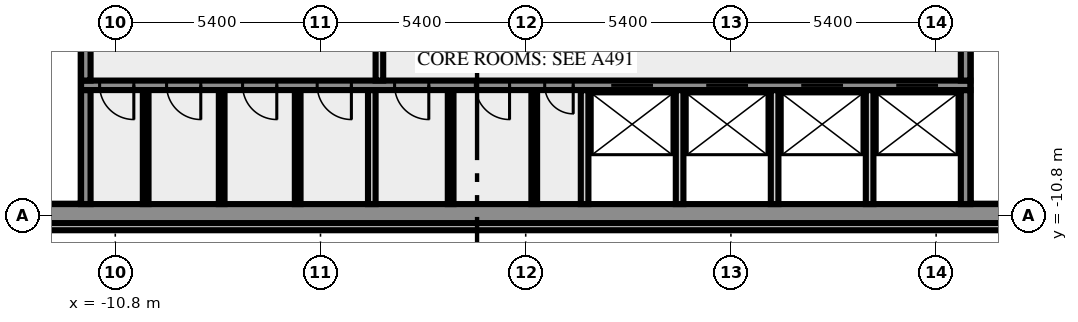
"""IFC4 building model, lengths in metres.
Left out: names, types, materials, properties, quantities, classifications, styles, units other than length and angle.
Written with IfcOpenShell. Run it as: python <this file> out.ifc"""

import sys

from ifc_helpers import new_model, si_unit, direction, frame, frame_2d, origin, place, context, subcontext, project, spatial, rectangle, extrude, element, fill, save


model = new_model("IFC4")
c1 = context("Model", 3, precision=1e-05, world=origin(), true_north=direction((0.0, 1.0)))
c2 = subcontext(c1, "Body", "Model", "MODEL_VIEW")
j1 = project(units=[si_unit("LENGTHUNIT", "METRE"), si_unit("PLANEANGLEUNIT", "RADIAN")], contexts=[c1])
p1 = place(None, origin())
s1 = spatial("IfcSite", under=j1, at=p1, CompositionType="ELEMENT")
p2 = place(p1, origin())
s2 = spatial("IfcBuilding", under=s1, at=p2, CompositionType="ELEMENT")
p3 = place(p2, frame((0.0, 0.0, 198.0)))
s3 = spatial("IfcBuildingStorey", under=s2, at=p3, CompositionType="ELEMENT", Elevation=198.0)
p4 = place(p3, frame((-17.444, -11.088, 0.0), z_axis=(0.0, 0.0, 1.0), x_axis=(1.0, 0.0, 0.0)))
e1 = element("IfcWall", 1, at=p4, inside=s3, PredefinedType="SOLIDWALL", context=c2, shape_type="SweptSolid", body=[
    extrude(rectangle(XDim=34.888, YDim=0.2, at=frame_2d((17.444, 0.0))), origin(), (0.0, 0.0, 1.0), 3.65),
])
p5 = place(p3, frame((-20.0, -10.75, 0.0), z_axis=(0.0, 0.0, 1.0), x_axis=(1.0, 0.0, 0.0)))
e2 = element("IfcWall", 2, at=p5, inside=s3, PredefinedType="SHEAR", context=c2, shape_type="SweptSolid", body=[
    extrude(rectangle(XDim=40.0, YDim=0.5, at=frame_2d((20.0, 0.0))), origin(), (0.0, 0.0, 1.0), 3.65),
])
p6 = place(p5, frame((0.8, 0.0, 1.0)))
e3 = element("IfcOpeningElement", 3, at=p6, cuts=e2, PredefinedType="OPENING", context=c2, shape_type="SweptSolid", body=[
    extrude(rectangle(XDim=1.2, YDim=1.2, at=frame_2d((0.6, 0.6))), frame((0.0, 0.26, 0.0), z_axis=(0.0, -1.0, 0.0), x_axis=(1.0, 0.0, 0.0)), (0.0, 0.0, 1.0), 0.52),
])
p7 = place(p5, frame((38.0, 0.0, 1.0)))
e4 = element("IfcOpeningElement", 4, at=p7, cuts=e2, PredefinedType="OPENING", context=c2, shape_type="SweptSolid", body=[
    extrude(rectangle(XDim=1.2, YDim=1.2, at=frame_2d((0.6, 0.6))), frame((0.0, 0.26, 0.0), z_axis=(0.0, -1.0, 0.0), x_axis=(1.0, 0.0, 0.0)), (0.0, 0.0, 1.0), 0.52),
])
p8 = place(p3, frame((-11.575, -10.5, 0.0), z_axis=(0.0, 0.0, 1.0), x_axis=(0.0, 1.0, 0.0)))
e5 = element("IfcWall", 5, at=p8, inside=s3, PredefinedType="SHEAR", context=c2, shape_type="SweptSolid", body=[
    extrude(rectangle(XDim=3.0, YDim=0.25, at=frame_2d((1.5, 0.0))), origin(), (0.0, 0.0, 1.0), 3.65),
])
for number, where, z_axis, x_axis in (
    (6, (-10.0, -10.5, 0.0), (0.0, 0.0, 1.0), (0.0, 1.0, 0.0)),
    (7, (-8.0, -10.5, 0.0), (0.0, 0.0, 1.0), (0.0, 1.0, 0.0)),
    (8, (-6.0, -10.5, 0.0), (0.0, 0.0, 1.0), (0.0, 1.0, 0.0)),
):
    element("IfcWall", number, at=place(p3, frame(where, z_axis=z_axis, x_axis=x_axis)), inside=s3, PredefinedType="PARTITIONING", context=c2, shape_type="SweptSolid", body=[
        extrude(rectangle(XDim=3.0, YDim=0.15, at=frame_2d((1.5, 0.0))), origin(), (0.0, 0.0, 1.0), 3.65),
    ])
p9 = place(p3, frame((-4.05, -10.5, 0.0), z_axis=(0.0, 0.0, 1.0), x_axis=(0.0, 1.0, 0.0)))
e9 = element("IfcWall", 9, at=p9, inside=s3, PredefinedType="SOLIDWALL", context=c2, shape_type="SweptSolid", body=[
    extrude(rectangle(XDim=3.0, YDim=0.2, at=frame_2d((1.5, 0.0))), origin(), (0.0, 0.0, 1.0), 3.65),
])
for number, where, z_axis, x_axis in (
    (10, (-1.975, -10.5, 0.0), (0.0, 0.0, 1.0), (0.0, 1.0, 0.0)),
    (11, (0.225, -10.5, 0.0), (0.0, 0.0, 1.0), (0.0, 1.0, 0.0)),
):
    element("IfcWall", number, at=place(p3, frame(where, z_axis=z_axis, x_axis=x_axis)), inside=s3, PredefinedType="PARTITIONING", context=c2, shape_type="SweptSolid", body=[
        extrude(rectangle(XDim=3.0, YDim=0.15, at=frame_2d((1.5, 0.0))), origin(), (0.0, 0.0, 1.0), 3.65),
    ])
for number, where, z_axis, x_axis in (
    (12, (1.55, -10.5, 0.0), (0.0, 0.0, 1.0), (0.0, 1.0, 0.0)),
    (13, (4.05, -10.5, 0.0), (0.0, 0.0, 1.0), (0.0, 1.0, 0.0)),
    (14, (6.55, -10.5, 0.0), (0.0, 0.0, 1.0), (0.0, 1.0, 0.0)),
    (15, (9.05, -10.5, 0.0), (0.0, 0.0, 1.0), (0.0, 1.0, 0.0)),
):
    element("IfcWall", number, at=place(p3, frame(where, z_axis=z_axis, x_axis=x_axis)), inside=s3, PredefinedType="SOLIDWALL", context=c2, shape_type="SweptSolid", body=[
        extrude(rectangle(XDim=3.0, YDim=0.2, at=frame_2d((1.5, 0.0))), origin(), (0.0, 0.0, 1.0), 3.65),
    ])
p10 = place(p3, frame((11.575, -10.5, 0.0), z_axis=(0.0, 0.0, 1.0), x_axis=(0.0, 1.0, 0.0)))
e16 = element("IfcWall", 16, at=p10, inside=s3, PredefinedType="SHEAR", context=c2, shape_type="SweptSolid", body=[
    extrude(rectangle(XDim=3.0, YDim=0.25, at=frame_2d((1.5, 0.0))), origin(), (0.0, 0.0, 1.0), 3.65),
])
p11 = place(p3, frame((11.7, -7.375, 0.0), z_axis=(0.0, 0.0, 1.0), x_axis=(-1.0, 0.0, 0.0)))
e17 = element("IfcWall", 17, at=p11, inside=s3, PredefinedType="SHEAR", context=c2, shape_type="SweptSolid", body=[
    extrude(rectangle(XDim=23.4, YDim=0.25, at=frame_2d((11.7, 0.0))), origin(), (0.0, 0.0, 1.0), 3.65),
])
p12 = place(p11, frame((22.012, 0.0, 0.0)))
e18 = element("IfcOpeningElement", 18, at=p12, cuts=e17, PredefinedType="OPENING", context=c2, shape_type="SweptSolid", body=[
    extrude(rectangle(XDim=0.9, YDim=2.1, at=frame_2d((0.45, 1.05))), frame((0.0, 0.135, 0.0), z_axis=(0.0, -1.0, 0.0), x_axis=(1.0, 0.0, 0.0)), (0.0, 0.0, 1.0), 0.27),
])
p13 = place(p11, frame((20.25, 0.0, 0.0)))
e19 = element("IfcOpeningElement", 19, at=p13, cuts=e17, PredefinedType="OPENING", context=c2, shape_type="SweptSolid", body=[
    extrude(rectangle(XDim=0.9, YDim=2.1, at=frame_2d((0.45, 1.05))), frame((0.0, 0.135, 0.0), z_axis=(0.0, -1.0, 0.0), x_axis=(1.0, 0.0, 0.0)), (0.0, 0.0, 1.0), 0.27),
])
p14 = place(p11, frame((18.25, 0.0, 0.0)))
e20 = element("IfcOpeningElement", 20, at=p14, cuts=e17, PredefinedType="OPENING", context=c2, shape_type="SweptSolid", body=[
    extrude(rectangle(XDim=0.9, YDim=2.1, at=frame_2d((0.45, 1.05))), frame((0.0, 0.135, 0.0), z_axis=(0.0, -1.0, 0.0), x_axis=(1.0, 0.0, 0.0)), (0.0, 0.0, 1.0), 0.27),
])
p15 = place(p11, frame((16.287, 0.0, 0.0)))
e21 = element("IfcOpeningElement", 21, at=p15, cuts=e17, PredefinedType="OPENING", context=c2, shape_type="SweptSolid", body=[
    extrude(rectangle(XDim=0.9, YDim=2.1, at=frame_2d((0.45, 1.05))), frame((0.0, 0.135, 0.0), z_axis=(0.0, -1.0, 0.0), x_axis=(1.0, 0.0, 0.0)), (0.0, 0.0, 1.0), 0.27),
])
p16 = place(p11, frame((14.25, 0.0, 0.0)))
e22 = element("IfcOpeningElement", 22, at=p16, cuts=e17, PredefinedType="OPENING", context=c2, shape_type="SweptSolid", body=[
    extrude(rectangle(XDim=0.9, YDim=2.1, at=frame_2d((0.45, 1.05))), frame((0.0, 0.135, 0.0), z_axis=(0.0, -1.0, 0.0), x_axis=(1.0, 0.0, 0.0)), (0.0, 0.0, 1.0), 0.27),
])
p17 = place(p11, frame((12.125, 0.0, 0.0)))
e23 = element("IfcOpeningElement", 23, at=p17, cuts=e17, PredefinedType="OPENING", context=c2, shape_type="SweptSolid", body=[
    extrude(rectangle(XDim=0.9, YDim=2.1, at=frame_2d((0.45, 1.05))), frame((0.0, 0.135, 0.0), z_axis=(0.0, -1.0, 0.0), x_axis=(1.0, 0.0, 0.0)), (0.0, 0.0, 1.0), 0.27),
])
p18 = place(p11, frame((10.45, 0.0, 0.0)))
e24 = element("IfcOpeningElement", 24, at=p18, cuts=e17, PredefinedType="OPENING", context=c2, shape_type="SweptSolid", body=[
    extrude(rectangle(XDim=0.75, YDim=2.1, at=frame_2d((0.375, 1.05))), frame((0.0, 0.135, 0.0), z_axis=(0.0, -1.0, 0.0), x_axis=(1.0, 0.0, 0.0)), (0.0, 0.0, 1.0), 0.27),
])
p19 = place(p11, frame((8.35, 0.0, 0.0)))
e25 = element("IfcOpeningElement", 25, at=p19, cuts=e17, PredefinedType="OPENING", context=c2, shape_type="SweptSolid", body=[
    extrude(rectangle(XDim=1.1, YDim=2.1, at=frame_2d((0.55, 1.05))), frame((0.0, 0.135, 0.0), z_axis=(0.0, -1.0, 0.0), x_axis=(1.0, 0.0, 0.0)), (0.0, 0.0, 1.0), 0.27),
])
p20 = place(p11, frame((5.85, 0.0, 0.0)))
e26 = element("IfcOpeningElement", 26, at=p20, cuts=e17, PredefinedType="OPENING", context=c2, shape_type="SweptSolid", body=[
    extrude(rectangle(XDim=1.1, YDim=2.1, at=frame_2d((0.55, 1.05))), frame((0.0, 0.135, 0.0), z_axis=(0.0, -1.0, 0.0), x_axis=(1.0, 0.0, 0.0)), (0.0, 0.0, 1.0), 0.27),
])
p21 = place(p11, frame((3.35, 0.0, 0.0)))
e27 = element("IfcOpeningElement", 27, at=p21, cuts=e17, PredefinedType="OPENING", context=c2, shape_type="SweptSolid", body=[
    extrude(rectangle(XDim=1.1, YDim=2.1, at=frame_2d((0.55, 1.05))), frame((0.0, 0.135, 0.0), z_axis=(0.0, -1.0, 0.0), x_axis=(1.0, 0.0, 0.0)), (0.0, 0.0, 1.0), 0.27),
])
p22 = place(p11, frame((0.85, 0.0, 0.0)))
e28 = element("IfcOpeningElement", 28, at=p22, cuts=e17, PredefinedType="OPENING", context=c2, shape_type="SweptSolid", body=[
    extrude(rectangle(XDim=1.1, YDim=2.1, at=frame_2d((0.55, 1.05))), frame((0.0, 0.135, 0.0), z_axis=(0.0, -1.0, 0.0), x_axis=(1.0, 0.0, 0.0)), (0.0, 0.0, 1.0), 0.27),
])
p23 = place(p3, frame((-11.575, -7.25, 0.0), z_axis=(0.0, 0.0, 1.0), x_axis=(0.0, 1.0, 0.0)))
e29 = element("IfcWall", 29, at=p23, inside=s3, PredefinedType="SHEAR", context=c2, shape_type="SweptSolid", body=[
    extrude(rectangle(XDim=1.0, YDim=0.25, at=frame_2d((0.5, 0.0))), origin(), (0.0, 0.0, 1.0), 3.65),
])
p24 = place(p3, frame((-3.85, -4.25, 0.0), z_axis=(0.0, 0.0, 1.0), x_axis=(0.0, -1.0, 0.0)))
e30 = element("IfcWall", 30, at=p24, inside=s3, PredefinedType="SOLIDWALL", context=c2, shape_type="SweptSolid", body=[
    extrude(rectangle(XDim=3.0, YDim=0.2, at=frame_2d((1.5, 0.0))), origin(), (0.0, 0.0, 1.0), 3.65),
])
p25 = place(p24, frame((0.8, 0.0, 0.0)))
e31 = element("IfcOpeningElement", 31, at=p25, cuts=e30, PredefinedType="OPENING", context=c2, shape_type="SweptSolid", body=[
    extrude(rectangle(XDim=1.4, YDim=2.1, at=frame_2d((0.7, 1.05))), frame((0.0, 0.11, 0.0), z_axis=(0.0, -1.0, 0.0), x_axis=(1.0, 0.0, 0.0)), (0.0, 0.0, 1.0), 0.22),
])
p26 = place(p3, frame((11.575, -7.25, 0.0), z_axis=(0.0, 0.0, 1.0), x_axis=(0.0, 1.0, 0.0)))
e32 = element("IfcWall", 32, at=p26, inside=s3, PredefinedType="SHEAR", context=c2, shape_type="SweptSolid", body=[
    extrude(rectangle(XDim=1.0, YDim=0.25, at=frame_2d((0.5, 0.0))), origin(), (0.0, 0.0, 1.0), 3.65),
])
p27 = place(p12, origin())
e33 = element("IfcDoor", 33, at=p27, inside=s3, OperationType="SINGLE_SWING_RIGHT", PredefinedType="DOOR", context=c2, shape_type="SweptSolid", body=[
    extrude(rectangle(XDim=0.9, YDim=2.1, at=frame_2d((0.45, 1.05))), frame((0.0, 0.025, 0.0), z_axis=(0.0, -1.0, 0.0), x_axis=(1.0, 0.0, 0.0)), (0.0, 0.0, 1.0), 0.05),
])
fill(e18, e33)
p28 = place(p13, origin())
e34 = element("IfcDoor", 34, at=p28, inside=s3, OperationType="SINGLE_SWING_RIGHT", PredefinedType="DOOR", context=c2, shape_type="SweptSolid", body=[
    extrude(rectangle(XDim=0.9, YDim=2.1, at=frame_2d((0.45, 1.05))), frame((0.0, 0.025, 0.0), z_axis=(0.0, -1.0, 0.0), x_axis=(1.0, 0.0, 0.0)), (0.0, 0.0, 1.0), 0.05),
])
fill(e19, e34)
p29 = place(p14, origin())
e35 = element("IfcDoor", 35, at=p29, inside=s3, OperationType="SINGLE_SWING_RIGHT", PredefinedType="DOOR", context=c2, shape_type="SweptSolid", body=[
    extrude(rectangle(XDim=0.9, YDim=2.1, at=frame_2d((0.45, 1.05))), frame((0.0, 0.025, 0.0), z_axis=(0.0, -1.0, 0.0), x_axis=(1.0, 0.0, 0.0)), (0.0, 0.0, 1.0), 0.05),
])
fill(e20, e35)
p30 = place(p15, origin())
e36 = element("IfcDoor", 36, at=p30, inside=s3, OperationType="SINGLE_SWING_RIGHT", PredefinedType="DOOR", context=c2, shape_type="SweptSolid", body=[
    extrude(rectangle(XDim=0.9, YDim=2.1, at=frame_2d((0.45, 1.05))), frame((0.0, 0.025, 0.0), z_axis=(0.0, -1.0, 0.0), x_axis=(1.0, 0.0, 0.0)), (0.0, 0.0, 1.0), 0.05),
])
fill(e21, e36)
p31 = place(p16, origin())
e37 = element("IfcDoor", 37, at=p31, inside=s3, OperationType="SINGLE_SWING_RIGHT", PredefinedType="DOOR", context=c2, shape_type="SweptSolid", body=[
    extrude(rectangle(XDim=0.9, YDim=2.1, at=frame_2d((0.45, 1.05))), frame((0.0, 0.025, 0.0), z_axis=(0.0, -1.0, 0.0), x_axis=(1.0, 0.0, 0.0)), (0.0, 0.0, 1.0), 0.05),
])
fill(e22, e37)
p32 = place(p17, origin())
e38 = element("IfcDoor", 38, at=p32, inside=s3, OperationType="SINGLE_SWING_RIGHT", PredefinedType="DOOR", context=c2, shape_type="SweptSolid", body=[
    extrude(rectangle(XDim=0.9, YDim=2.1, at=frame_2d((0.45, 1.05))), frame((0.0, 0.025, 0.0), z_axis=(0.0, -1.0, 0.0), x_axis=(1.0, 0.0, 0.0)), (0.0, 0.0, 1.0), 0.05),
])
fill(e23, e38)
p33 = place(p18, origin())
e39 = element("IfcDoor", 39, at=p33, inside=s3, OperationType="SINGLE_SWING_LEFT", PredefinedType="DOOR", context=c2, shape_type="SweptSolid", body=[
    extrude(rectangle(XDim=0.75, YDim=2.1, at=frame_2d((0.375, 1.05))), frame((0.0, 0.025, 0.0), z_axis=(0.0, -1.0, 0.0), x_axis=(1.0, 0.0, 0.0)), (0.0, 0.0, 1.0), 0.05),
])
fill(e24, e39)
p34 = place(p19, origin())
e40 = element("IfcDoor", 40, at=p34, inside=s3, OperationType="DOUBLE_DOOR_SLIDING", PredefinedType="DOOR", context=c2, shape_type="SweptSolid", body=[
    extrude(rectangle(XDim=1.1, YDim=2.1, at=frame_2d((0.55, 1.05))), frame((0.0, 0.025, 0.0), z_axis=(0.0, -1.0, 0.0), x_axis=(1.0, 0.0, 0.0)), (0.0, 0.0, 1.0), 0.05),
])
fill(e25, e40)
p35 = place(p20, origin())
e41 = element("IfcDoor", 41, at=p35, inside=s3, OperationType="DOUBLE_DOOR_SLIDING", PredefinedType="DOOR", context=c2, shape_type="SweptSolid", body=[
    extrude(rectangle(XDim=1.1, YDim=2.1, at=frame_2d((0.55, 1.05))), frame((0.0, 0.025, 0.0), z_axis=(0.0, -1.0, 0.0), x_axis=(1.0, 0.0, 0.0)), (0.0, 0.0, 1.0), 0.05),
])
fill(e26, e41)
p36 = place(p21, origin())
e42 = element("IfcDoor", 42, at=p36, inside=s3, OperationType="DOUBLE_DOOR_SLIDING", PredefinedType="DOOR", context=c2, shape_type="SweptSolid", body=[
    extrude(rectangle(XDim=1.1, YDim=2.1, at=frame_2d((0.55, 1.05))), frame((0.0, 0.025, 0.0), z_axis=(0.0, -1.0, 0.0), x_axis=(1.0, 0.0, 0.0)), (0.0, 0.0, 1.0), 0.05),
])
fill(e27, e42)
p37 = place(p22, origin())
e43 = element("IfcDoor", 43, at=p37, inside=s3, OperationType="DOUBLE_DOOR_SLIDING", PredefinedType="DOOR", context=c2, shape_type="SweptSolid", body=[
    extrude(rectangle(XDim=1.1, YDim=2.1, at=frame_2d((0.55, 1.05))), frame((0.0, 0.025, 0.0), z_axis=(0.0, -1.0, 0.0), x_axis=(1.0, 0.0, 0.0)), (0.0, 0.0, 1.0), 0.05),
])
fill(e28, e43)
save(model, sys.argv[1])
